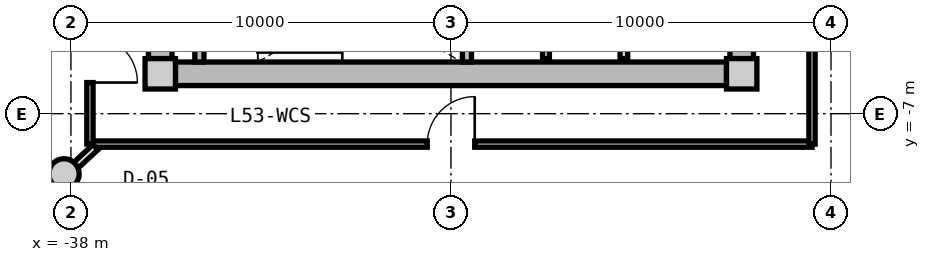
"""IFC4 building model, lengths in metres.
Left out: names, types, materials, properties, quantities, classifications, styles, units other than length and angle.
Written with IfcOpenShell. Run it as: python <this file> out.ifc"""

import sys

from ifc_helpers import new_model, si_unit, direction, frame, frame_2d, origin, origin_2d, place, context, subcontext, project, spatial, rectangle, circle, extrude, source, transform, mapped, element, fill, save


model = new_model("IFC4")
c1 = context("Model", 3, precision=1e-05, world=origin(), true_north=direction((0.0, 1.0)))
c2 = subcontext(c1, "Body", "Model", "MODEL_VIEW")
j1 = project(units=[si_unit("LENGTHUNIT", "METRE"), si_unit("PLANEANGLEUNIT", "RADIAN")], contexts=[c1])
p1 = place(None, origin())
s1 = spatial("IfcSite", under=j1, at=p1, CompositionType="ELEMENT")
p2 = place(p1, origin())
s2 = spatial("IfcBuilding", under=s1, at=p2, CompositionType="ELEMENT")
p3 = place(p2, frame((0.0, 0.0, 170.9)))
s3 = spatial("IfcBuildingStorey", under=s2, at=p3, CompositionType="ELEMENT", Elevation=170.9)
m1 = source(origin(), c2, "Body", "SweptSolid", [
    extrude(rectangle(XDim=0.8, YDim=0.8, at=origin_2d()), origin(), (0.0, 0.0, 1.0), 3.05),
])
for number, where, z_axis, x_axis in (
    (1, (-35.65, -5.95, 0.0), (0.0, 0.0, 1.0), (1.0, 0.0, 0.0)),
    (2, (-20.35, -5.95, 0.0), (0.0, 0.0, 1.0), (1.0, 0.0, 0.0)),
):
    element("IfcColumn", number, at=place(p3, frame(where, z_axis=z_axis, x_axis=x_axis)), inside=s3, PredefinedType="COLUMN", context=c2, shape_type="MappedRepresentation", body=[
        mapped(m1, transform((0.0, 0.0, 0.0), x_axis=(1.0, 0.0, 0.0), y_axis=(0.0, 1.0, 0.0), z_axis=(0.0, 0.0, 1.0), scale=1.0)),
    ])
m2 = source(origin(), c2, "Body", "SweptSolid", [
    extrude(rectangle(XDim=14.5, YDim=0.62, at=frame_2d((7.25, 0.0))), origin(), (0.0, 0.0, 1.0), 2.81),
])
p4 = place(p3, frame((-20.75, -5.95, 0.0), z_axis=(0.0, 0.0, 1.0), x_axis=(-1.0, 0.0, 0.0)))
e3 = element("IfcWall", 3, at=p4, inside=s3, PredefinedType="SHEAR", context=c2, shape_type="MappedRepresentation", body=[
    mapped(m2, transform((0.0, 0.0, 0.0), x_axis=(1.0, 0.0, 0.0), y_axis=(0.0, 1.0, 0.0), z_axis=(0.0, 0.0, 1.0), scale=1.0)),
])
m3 = source(origin(), c2, "Body", "SweptSolid", [
    extrude(rectangle(XDim=11.1, YDim=0.62, at=frame_2d((5.55, 0.0))), origin(), (0.0, 0.0, 1.0), 2.81),
])
p5 = place(p3, frame((-35.65, -5.55, 0.0), z_axis=(0.0, 0.0, 1.0), x_axis=(0.0, 1.0, 0.0)))
e4 = element("IfcWall", 4, at=p5, inside=s3, PredefinedType="SHEAR", context=c2, shape_type="MappedRepresentation", body=[
    mapped(m3, transform((0.0, 0.0, 0.0), x_axis=(1.0, 0.0, 0.0), y_axis=(0.0, 1.0, 0.0), z_axis=(0.0, 0.0, 1.0), scale=1.0)),
])
p6 = place(p5, frame((3.8, 0.0, 0.0)))
e5 = element("IfcOpeningElement", 5, at=p6, cuts=e4, PredefinedType="OPENING", context=c2, shape_type="SweptSolid", body=[
    extrude(rectangle(XDim=1.2, YDim=2.15, at=frame_2d((0.6, 1.075))), frame((0.0, 0.32, 0.0), z_axis=(0.0, -1.0, 0.0), x_axis=(1.0, 0.0, 0.0)), (0.0, 0.0, 1.0), 0.64),
])
p7 = place(p3, frame((-20.35, 5.55, 0.0), z_axis=(0.0, 0.0, 1.0), x_axis=(0.0, -1.0, 0.0)))
e6 = element("IfcWall", 6, at=p7, inside=s3, PredefinedType="SHEAR", context=c2, shape_type="MappedRepresentation", body=[
    mapped(m3, transform((0.0, 0.0, 0.0), x_axis=(1.0, 0.0, 0.0), y_axis=(0.0, 1.0, 0.0), z_axis=(0.0, 0.0, 1.0), scale=1.0)),
])
p8 = place(p7, frame((5.65, 0.0, 0.0)))
e7 = element("IfcOpeningElement", 7, at=p8, cuts=e6, PredefinedType="OPENING", context=c2, shape_type="SweptSolid", body=[
    extrude(rectangle(XDim=1.2, YDim=2.15, at=frame_2d((0.6, 1.075))), frame((0.0, 0.32, 0.0), z_axis=(0.0, -1.0, 0.0), x_axis=(1.0, 0.0, 0.0)), (0.0, 0.0, 1.0), 0.64),
])
p9 = place(p7, frame((9.3, 0.0, 0.0)))
e8 = element("IfcOpeningElement", 8, at=p9, cuts=e6, PredefinedType="OPENING", context=c2, shape_type="SweptSolid", body=[
    extrude(rectangle(XDim=1.0, YDim=2.1, at=frame_2d((0.5, 1.05))), frame((0.0, 0.32, 0.0), z_axis=(0.0, -1.0, 0.0), x_axis=(1.0, 0.0, 0.0)), (0.0, 0.0, 1.0), 0.64),
])
m4 = source(origin(), c2, "Body", "SweptSolid", [
    extrude(circle(Radius=0.4, at=origin_2d()), origin(), (0.0, 0.0, 1.0), 3.05),
])
p10 = place(p3, frame((-38.183, -8.584, 0.0), z_axis=(0.0, 0.0, 1.0), x_axis=(1.0, 0.0, 0.0)))
e9 = element("IfcColumn", 9, at=p10, inside=s3, PredefinedType="COLUMN", context=c2, shape_type="MappedRepresentation", body=[
    mapped(m4, transform((0.0, 0.0, 0.0), x_axis=(1.0, 0.0, 0.0), y_axis=(0.0, 1.0, 0.0), z_axis=(0.0, 0.0, 1.0), scale=1.0)),
])
m5 = source(origin(), c2, "Body", "SweptSolid", [
    extrude(rectangle(XDim=3.19, YDim=0.24, at=frame_2d((1.595, 0.0))), origin(), (0.0, 0.0, 1.0), 2.81),
])
for number, where, z_axis, x_axis in (
    (10, (-34.62, -5.64, 0.0), (0.0, 0.0, 1.0), (0.0, 1.0, 0.0)),
    (11, (-27.58, -5.64, 0.0), (0.0, 0.0, 1.0), (0.0, 1.0, 0.0)),
):
    element("IfcWall", number, at=place(p3, frame(where, z_axis=z_axis, x_axis=x_axis)), inside=s3, PredefinedType="PARTITIONING", context=c2, shape_type="MappedRepresentation", body=[
        mapped(m5, transform((0.0, 0.0, 0.0), x_axis=(1.0, 0.0, 0.0), y_axis=(0.0, 1.0, 0.0), z_axis=(0.0, 0.0, 1.0), scale=1.0)),
    ])
m6 = source(origin(), c2, "Body", "SweptSolid", [
    extrude(rectangle(XDim=3.8, YDim=0.2, at=frame_2d((1.9, 0.0))), origin(), (0.0, 0.0, 1.0), 2.795),
])
p11 = place(p3, frame((-23.45, -5.55, 0.0), z_axis=(0.0, 0.0, 1.0), x_axis=(0.0, 1.0, 0.0)))
e12 = element("IfcWall", 12, at=p11, inside=s3, PredefinedType="PARTITIONING", context=c2, shape_type="MappedRepresentation", body=[
    mapped(m6, transform((0.0, 0.0, 0.0), x_axis=(1.0, 0.0, 0.0), y_axis=(0.0, 1.0, 0.0), z_axis=(0.0, 0.0, 1.0), scale=1.0)),
])
m7 = source(origin(), c2, "Body", "SweptSolid", [
    extrude(rectangle(XDim=4.2, YDim=0.18, at=frame_2d((2.1, 0.0))), origin(), (0.0, 0.0, 1.0), 2.795),
])
p12 = place(p3, frame((-25.5, -5.55, 0.0), z_axis=(0.0, 0.0, 1.0), x_axis=(0.0, 1.0, 0.0)))
e13 = element("IfcWall", 13, at=p12, inside=s3, PredefinedType="PARTITIONING", context=c2, shape_type="MappedRepresentation", body=[
    mapped(m7, transform((0.0, 0.0, 0.0), x_axis=(1.0, 0.0, 0.0), y_axis=(0.0, 1.0, 0.0), z_axis=(0.0, 0.0, 1.0), scale=1.0)),
])
m8 = source(origin(), c2, "Body", "SweptSolid", [
    extrude(rectangle(XDim=19.0, YDim=0.165, at=frame_2d((9.5, 0.0))), origin(), (0.0, 0.0, 1.0), 2.795),
])
p13 = place(p3, frame((-18.5, -7.8, 0.0), z_axis=(0.0, 0.0, 1.0), x_axis=(-1.0, 0.0, 0.0)))
e14 = element("IfcWall", 14, at=p13, inside=s3, PredefinedType="PARTITIONING", context=c2, shape_type="MappedRepresentation", body=[
    mapped(m8, transform((0.0, 0.0, 0.0), x_axis=(1.0, 0.0, 0.0), y_axis=(0.0, 1.0, 0.0), z_axis=(0.0, 0.0, 1.0), scale=1.0)),
])
p14 = place(p13, frame((8.875, 0.0, 0.0)))
e15 = element("IfcOpeningElement", 15, at=p14, cuts=e14, PredefinedType="OPENING", context=c2, shape_type="SweptSolid", body=[
    extrude(rectangle(XDim=1.25, YDim=2.2, at=frame_2d((0.625, 1.1))), frame((0.0, 0.093, 0.0), z_axis=(0.0, -1.0, 0.0), x_axis=(1.0, 0.0, 0.0)), (0.0, 0.0, 1.0), 0.185),
])
m9 = source(origin(), c2, "Body", "SweptSolid", [
    extrude(rectangle(XDim=6.88, YDim=0.165, at=frame_2d((3.44, 0.0))), origin(), (0.0, 0.0, 1.0), 2.795),
])
p15 = place(p3, frame((-37.5, -7.8, 0.0), z_axis=(0.0, 0.0, 1.0), x_axis=(0.0, 1.0, 0.0)))
e16 = element("IfcWall", 16, at=p15, inside=s3, PredefinedType="PARTITIONING", context=c2, shape_type="MappedRepresentation", body=[
    mapped(m9, transform((0.0, 0.0, 0.0), x_axis=(1.0, 0.0, 0.0), y_axis=(0.0, 1.0, 0.0), z_axis=(0.0, 0.0, 1.0), scale=1.0)),
])
p16 = place(p15, frame((1.62, 0.0, 0.0)))
e17 = element("IfcOpeningElement", 17, at=p16, cuts=e16, PredefinedType="OPENING", context=c2, shape_type="SweptSolid", body=[
    extrude(rectangle(XDim=1.25, YDim=2.2, at=frame_2d((0.625, 1.1))), frame((0.0, 0.093, 0.0), z_axis=(0.0, -1.0, 0.0), x_axis=(1.0, 0.0, 0.0)), (0.0, 0.0, 1.0), 0.185),
])
m10 = source(origin(), c2, "Body", "SweptSolid", [
    extrude(rectangle(XDim=7.365, YDim=0.165, at=frame_2d((3.682, 0.0))), origin(), (0.0, 0.0, 1.0), 2.795),
])
p17 = place(p3, frame((-18.5, -0.436, 0.0), z_axis=(0.0, 0.0, 1.0), x_axis=(0.0, -1.0, 0.0)))
e18 = element("IfcWall", 18, at=p17, inside=s3, PredefinedType="PARTITIONING", context=c2, shape_type="MappedRepresentation", body=[
    mapped(m10, transform((0.0, 0.0, 0.0), x_axis=(1.0, 0.0, 0.0), y_axis=(0.0, 1.0, 0.0), z_axis=(0.0, 0.0, 1.0), scale=1.0)),
])
m11 = source(origin(), c2, "Body", "SweptSolid", [
    extrude(rectangle(XDim=2.435, YDim=0.19, at=frame_2d((1.217, 0.0))), origin(), (0.0, 0.0, 1.0), 2.345),
])
p18 = place(p3, frame((-37.354, -7.88, 0.0), z_axis=(0.0, 0.0, 1.0), x_axis=(-0.732164643118, -0.681127693878, 0.0)))
e19 = element("IfcWall", 19, at=p18, inside=s3, PredefinedType="PARTITIONING", context=c2, shape_type="MappedRepresentation", body=[
    mapped(m11, transform((0.0, 0.0, 0.0), x_axis=(1.0, 0.0, 0.0), y_axis=(0.0, 1.0, 0.0), z_axis=(0.0, 0.0, 1.0), scale=1.0)),
])
m12 = source(origin(), c2, "Body", "SweptSolid", [
    extrude(rectangle(XDim=1.25, YDim=2.2, at=frame_2d((0.625, 1.1))), frame((0.0, 0.025, 0.0), z_axis=(0.0, -1.0, 0.0), x_axis=(1.0, 0.0, 0.0)), (0.0, 0.0, 1.0), 0.05),
])
p19 = place(p16, frame((1.25, 0.0, 0.0), z_axis=(0.0, 0.0, 1.0), x_axis=(-1.0, 0.0, 0.0)))
e20 = element("IfcDoor", 20, at=p19, inside=s3, OperationType="SINGLE_SWING_RIGHT", PredefinedType="DOOR", context=c2, shape_type="MappedRepresentation", body=[
    mapped(m12, transform((0.0, 0.0, 0.0), x_axis=(1.0, 0.0, 0.0), y_axis=(0.0, 1.0, 0.0), z_axis=(0.0, 0.0, 1.0), scale=1.0)),
])
fill(e17, e20)
p20 = place(p14, frame((1.25, 0.0, 0.0), z_axis=(0.0, 0.0, 1.0), x_axis=(-1.0, 0.0, 0.0)))
e21 = element("IfcDoor", 21, at=p20, inside=s3, OperationType="SINGLE_SWING_RIGHT", PredefinedType="DOOR", context=c2, shape_type="MappedRepresentation", body=[
    mapped(m12, transform((0.0, 0.0, 0.0), x_axis=(1.0, 0.0, 0.0), y_axis=(0.0, 1.0, 0.0), z_axis=(0.0, 0.0, 1.0), scale=1.0)),
])
fill(e15, e21)
save(model, sys.argv[1])
